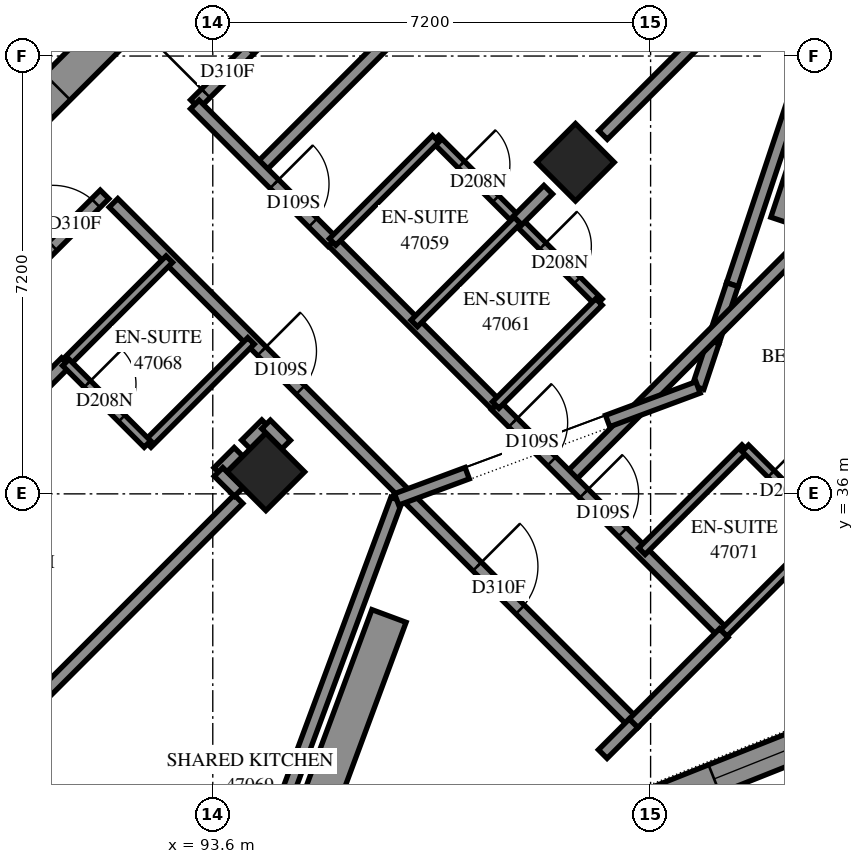
"""IFC4 building model, lengths in metres.
Left out: names, types, materials, properties, quantities, classifications, styles, units other than length and angle.
Written with IfcOpenShell. Run it as: python <this file> out.ifc"""

import sys

from ifc_helpers import new_model, si_unit, direction, frame, frame_2d, origin, origin_2d, place, context, subcontext, project, spatial, polyline, rectangle, outline, extrude, element, fill, save


model = new_model("IFC4")
c1 = context("Model", 3, precision=1e-05, world=origin(), true_north=direction((0.0, 1.0)))
c2 = subcontext(c1, "Body", "Model", "MODEL_VIEW")
j1 = project(units=[si_unit("LENGTHUNIT", "METRE"), si_unit("PLANEANGLEUNIT", "RADIAN")], contexts=[c1])
p1 = place(None, origin())
s1 = spatial("IfcSite", under=j1, at=p1, CompositionType="ELEMENT")
p2 = place(p1, origin())
s2 = spatial("IfcBuilding", under=s1, at=p2, CompositionType="ELEMENT")
p3 = place(p2, frame((0.0, 0.0, 172.8)))
s3 = spatial("IfcBuildingStorey", under=s2, at=p3, CompositionType="ELEMENT", Elevation=172.8)
for number, where, z_axis, x_axis in (
    (1, (99.565, 41.453, 0.0), (0.0, 0.0, 1.0), (0.707, -0.707, 0.0)),
    (2, (94.474, 36.362, 0.0), (0.0, 0.0, 1.0), (0.707, -0.707, 0.0)),
):
    element("IfcColumn", number, at=place(p3, frame(where, z_axis=z_axis, x_axis=x_axis)), inside=s3, PredefinedType="COLUMN", context=c2, shape_type="SweptSolid", body=[
        extrude(rectangle(XDim=0.9, YDim=0.9, at=origin_2d()), origin(), (0.0, 0.0, 1.0), 3.1),
    ])
p4 = place(p3, frame((87.049, 38.695, -0.3), z_axis=(0.0, 0.0, 1.0), x_axis=(0.7071067812, 0.7071067812, 0.0)))
e3 = element("IfcWall", 3, at=p4, inside=s3, PredefinedType="SHEAR", context=c2, shape_type="SweptSolid", body=[
    extrude(rectangle(XDim=14.4, YDim=0.6, at=frame_2d((7.2, 0.0))), origin(), (0.0, 0.0, 1.0), 2.7),
])
p5 = place(p4, frame((4.55, 0.0, 0.3)))
e4 = element("IfcOpeningElement", 4, at=p5, cuts=e3, PredefinedType="OPENING", context=c2, shape_type="SweptSolid", body=[
    extrude(rectangle(XDim=1.1, YDim=2.1, at=frame_2d((0.55, 1.05))), frame((0.0, 0.31, 0.0), z_axis=(0.0, -1.0, 0.0), x_axis=(1.0, 0.0, 0.0)), (0.0, 0.0, 1.0), 0.62),
])
p6 = place(p4, frame((11.35, 0.0, 0.3)))
e5 = element("IfcOpeningElement", 5, at=p6, cuts=e3, PredefinedType="OPENING", context=c2, shape_type="SweptSolid", body=[
    extrude(rectangle(XDim=1.1, YDim=2.1, at=frame_2d((0.55, 1.05))), frame((0.0, 0.31, 0.0), z_axis=(0.0, -1.0, 0.0), x_axis=(1.0, 0.0, 0.0)), (0.0, 0.0, 1.0), 0.62),
])
p7 = place(p3, frame((100.776, 30.887, 0.0), z_axis=(0.0, 0.0, 1.0), x_axis=(0.9291503682, 0.3697020331, 0.0)))
e6 = element("IfcWall", 6, at=p7, inside=s3, PredefinedType="SOLIDWALL", context=c2, shape_type="SweptSolid", body=[
    extrude(outline(polyline([(0.108, -0.25), (5.669, -0.25), (5.444, 0.25), (-0.108, 0.25), (0.108, -0.25)])), origin(), (0.0, 0.0, 1.0), 3.1),
])
p8 = place(p7, frame((1.15, 0.0, 0.7)))
e7 = element("IfcOpeningElement", 7, at=p8, cuts=e6, PredefinedType="OPENING", context=c2, shape_type="SweptSolid", body=[
    extrude(rectangle(XDim=1.8, YDim=2.1, at=frame_2d((0.9, 1.05))), frame((0.0, 0.26, 0.0), z_axis=(0.0, -1.0, 0.0), x_axis=(1.0, 0.0, 0.0)), (0.0, 0.0, 1.0), 0.52),
])
p9 = place(p3, frame((100.13, 46.544, 0.0), z_axis=(0.0, 0.0, 1.0), x_axis=(0.7070852627, -0.707128299, 0.0)))
e8 = element("IfcWall", 8, at=p9, inside=s3, PredefinedType="PARAPET", context=c2, shape_type="SweptSolid", body=[
    extrude(outline(polyline([(-0.1, -0.1), (4.585, -0.1), (4.709, 0.1), (0.1, 0.1), (-0.1, -0.1)])), origin(), (0.0, 0.0, 1.0), 0.25),
])
p10 = place(p3, frame((103.291, 42.881, 0.0), z_axis=(0.0, 0.0, 1.0), x_axis=(-0.3162443117, -0.9486777827, 0.0)))
e9 = element("IfcWall", 9, at=p10, inside=s3, PredefinedType="PARAPET", context=c2, shape_type="SweptSolid", body=[
    extrude(outline(polyline([(0.0, -0.1), (3.626, -0.1), (3.626, 0.1), (0.0, 0.1), (0.0, -0.1)])), origin(), (0.0, 0.0, 1.0), 0.25),
])
p11 = place(p3, frame((102.144, 39.441, 0.0), z_axis=(0.0, 0.0, 1.0), x_axis=(-0.3161671582, -0.9487034985, 0.0)))
e10 = element("IfcWall", 10, at=p11, inside=s3, PredefinedType="PARAPET", context=c2, shape_type="SweptSolid", body=[
    extrude(outline(polyline([(0.0, -0.1), (0.99, -0.1), (0.99, 0.1), (0.0, 0.1), (0.0, -0.1)])), origin(), (0.0, 0.0, 1.0), 0.25),
])
p12 = place(p3, frame((101.831, 38.502, 0.0), z_axis=(0.0, 0.0, 1.0), x_axis=(-0.3163035263, -0.9486580413, 0.0)))
e11 = element("IfcWall", 11, at=p12, inside=s3, PredefinedType="PARAPET", context=c2, shape_type="SweptSolid", body=[
    extrude(outline(polyline([(0.0, -0.1), (0.744, -0.1), (0.84, 0.1), (0.0, 0.1), (0.0, -0.1)])), origin(), (0.0, 0.0, 1.0), 0.25),
])
p13 = place(p3, frame((96.623, 35.909, 0.0), z_axis=(0.0, 0.0, 1.0), x_axis=(-0.3481832062, -0.9374265064, 0.0)))
e12 = element("IfcWall", 12, at=p13, inside=s3, PredefinedType="PARAPET", context=c2, shape_type="SweptSolid", body=[
    extrude(outline(polyline([(-0.046, -0.1), (5.24, -0.1), (5.336, 0.1), (0.046, 0.1), (-0.046, -0.1)])), origin(), (0.0, 0.0, 1.0), 0.25),
])
p14 = place(p3, frame((103.623, 42.138, 0.0), z_axis=(0.0, 0.0, 1.0), x_axis=(-0.3162446684, -0.9486776638, 0.0)))
e13 = element("IfcWall", 13, at=p14, inside=s3, PredefinedType="SOLIDWALL", context=c2, shape_type="SweptSolid", body=[
    extrude(rectangle(XDim=1.775, YDim=0.6, at=frame_2d((0.887, 0.0))), origin(), (0.0, 0.0, 1.0), 0.65),
])
p15 = place(p3, frame((96.498, 33.992, 0.0), z_axis=(0.0, 0.0, 1.0), x_axis=(-0.3481905653, -0.937423773, 0.0)))
e14 = element("IfcWall", 14, at=p15, inside=s3, PredefinedType="SOLIDWALL", context=c2, shape_type="SweptSolid", body=[
    extrude(rectangle(XDim=3.111, YDim=0.6, at=frame_2d((1.555, 0.0))), origin(), (0.0, 0.0, 1.0), 0.65),
])
p16 = place(p3, frame((94.366, 41.348, 0.0), z_axis=(0.0, 0.0, 1.0), x_axis=(0.7071108825, 0.7071026798, 0.0)))
e15 = element("IfcWall", 15, at=p16, inside=s3, PredefinedType="PARTITIONING", context=c2, shape_type="SweptSolid", body=[
    extrude(rectangle(XDim=12.191, YDim=0.2, at=frame_2d((6.096, 0.0))), origin(), (0.0, 0.0, 1.0), 3.1),
])
p17 = place(p3, frame((91.967, 40.785, 0.0), z_axis=(0.0, 0.0, 1.0), x_axis=(0.7071067812, -0.7071067812, 0.0)))
e16 = element("IfcWall", 16, at=p17, inside=s3, PredefinedType="PARTITIONING", context=c2, shape_type="SweptSolid", body=[
    extrude(rectangle(XDim=12.1, YDim=0.2, at=frame_2d((6.05, 0.0))), origin(), (0.0, 0.0, 1.0), 3.1),
])
p18 = place(p17, frame((3.448, 0.0, 0.0)))
e17 = element("IfcOpeningElement", 17, at=p18, cuts=e16, PredefinedType="OPENING", context=c2, shape_type="SweptSolid", body=[
    extrude(rectangle(XDim=0.9, YDim=2.1, at=frame_2d((0.45, 1.05))), frame((0.0, 0.11, 0.0), z_axis=(0.0, -1.0, 0.0), x_axis=(1.0, 0.0, 0.0)), (0.0, 0.0, 1.0), 0.22),
])
p19 = place(p17, frame((8.457, 0.0, 0.0)))
e18 = element("IfcOpeningElement", 18, at=p19, cuts=e16, PredefinedType="OPENING", context=c2, shape_type="SweptSolid", body=[
    extrude(rectangle(XDim=1.0, YDim=2.1, at=frame_2d((0.5, 1.05))), frame((0.0, 0.11, 0.0), z_axis=(0.0, -1.0, 0.0), x_axis=(1.0, 0.0, 0.0)), (0.0, 0.0, 1.0), 0.22),
])
p20 = place(p3, frame((93.306, 42.408, 0.0), z_axis=(0.0, 0.0, 1.0), x_axis=(0.7071067812, 0.7071067812, 0.0)))
e19 = element("IfcWall", 19, at=p20, inside=s3, PredefinedType="PARTITIONING", context=c2, shape_type="SweptSolid", body=[
    extrude(rectangle(XDim=9.45, YDim=0.2, at=frame_2d((4.725, 0.0))), origin(), (0.0, 0.0, 1.0), 3.1),
])
p21 = place(p20, frame((0.253, 0.0, 0.0)))
e20 = element("IfcOpeningElement", 20, at=p21, cuts=e19, PredefinedType="OPENING", context=c2, shape_type="SweptSolid", body=[
    extrude(rectangle(XDim=1.0, YDim=2.1, at=frame_2d((0.5, 1.05))), frame((0.0, 0.11, 0.0), z_axis=(0.0, -1.0, 0.0), x_axis=(1.0, 0.0, 0.0)), (0.0, 0.0, 1.0), 0.22),
])
p22 = place(p3, frame((86.834, 35.94, 0.0), z_axis=(0.0, 0.0, 1.0), x_axis=(0.7072486139, 0.7069649201, 0.0)))
e21 = element("IfcWall", 21, at=p22, inside=s3, PredefinedType="PARTITIONING", context=c2, shape_type="SweptSolid", body=[
    extrude(rectangle(XDim=7.05, YDim=0.2, at=frame_2d((3.525, 0.0))), origin(), (0.0, 0.0, 1.0), 3.1),
])
p23 = place(p22, frame((5.848, 0.0, 0.0)))
e22 = element("IfcOpeningElement", 22, at=p23, cuts=e21, PredefinedType="OPENING", context=c2, shape_type="SweptSolid", body=[
    extrude(rectangle(XDim=1.0, YDim=2.1, at=frame_2d((0.5, 1.05))), frame((0.0, 0.11, 0.0), z_axis=(0.0, -1.0, 0.0), x_axis=(1.0, 0.0, 0.0)), (0.0, 0.0, 1.0), 0.22),
])
p24 = place(p3, frame((86.33, 33.314, 0.0), z_axis=(0.0, 0.0, 1.0), x_axis=(0.7072524653, 0.7069610671, 0.0)))
e23 = element("IfcWall", 23, at=p24, inside=s3, PredefinedType="PARTITIONING", context=c2, shape_type="SweptSolid", body=[
    extrude(rectangle(XDim=6.864, YDim=0.2, at=frame_2d((3.432, 0.0))), origin(), (0.0, 0.0, 1.0), 3.1),
])
p25 = place(p3, frame((99.458, 36.256, 0.0), z_axis=(0.0, 0.0, 1.0), x_axis=(0.7071067812, 0.7071067812, 0.0)))
e24 = element("IfcWall", 24, at=p25, inside=s3, PredefinedType="PARTITIONING", context=c2, shape_type="SweptSolid", body=[
    extrude(rectangle(XDim=6.85, YDim=0.2, at=frame_2d((3.425, 0.0))), origin(), (0.0, 0.0, 1.0), 3.1),
])
p26 = place(p3, frame((89.831, 31.721, 0.0), z_axis=(0.0, 0.0, 1.0), x_axis=(0.7071067812, 0.7071067812, 0.0)))
e25 = element("IfcWall", 25, at=p26, inside=s3, PredefinedType="PARTITIONING", context=c2, shape_type="SweptSolid", body=[
    extrude(rectangle(XDim=5.928, YDim=0.2, at=frame_2d((2.964, 0.0))), origin(), (0.0, 0.0, 1.0), 2.6),
])
p27 = place(p3, frame((100.017, 41.901, 0.0), z_axis=(0.0, 0.0, 1.0), x_axis=(0.7072754814, 0.7069380408, 0.0)))
e26 = element("IfcWall", 26, at=p27, inside=s3, PredefinedType="PARTITIONING", context=c2, shape_type="SweptSolid", body=[
    extrude(rectangle(XDim=5.927, YDim=0.2, at=frame_2d((2.963, 0.0))), origin(), (0.0, 0.0, 1.0), 3.1),
])
p28 = place(p3, frame((98.253, 37.455, 0.0), z_axis=(0.0, 0.0, 1.0), x_axis=(0.7071067812, -0.7071067812, 0.0)))
e27 = element("IfcWall", 27, at=p28, inside=s3, PredefinedType="PARTITIONING", context=c2, shape_type="SweptSolid", body=[
    extrude(rectangle(XDim=5.301, YDim=0.2, at=frame_2d((2.65, 0.0))), origin(), (0.0, 0.0, 1.0), 3.1),
])
p29 = place(p28, frame((0.401, 0.0, 0.0)))
e28 = element("IfcOpeningElement", 28, at=p29, cuts=e27, PredefinedType="OPENING", context=c2, shape_type="SweptSolid", body=[
    extrude(rectangle(XDim=0.9, YDim=2.1, at=frame_2d((0.45, 1.05))), frame((0.0, 0.11, 0.0), z_axis=(0.0, -1.0, 0.0), x_axis=(1.0, 0.0, 0.0)), (0.0, 0.0, 1.0), 0.22),
])
p30 = place(p28, frame((2.05, 0.0, 0.0)))
e29 = element("IfcOpeningElement", 29, at=p30, cuts=e27, PredefinedType="OPENING", context=c2, shape_type="SweptSolid", body=[
    extrude(rectangle(XDim=0.9, YDim=2.1, at=frame_2d((0.45, 1.05))), frame((0.0, 0.11, 0.0), z_axis=(0.0, -1.0, 0.0), x_axis=(1.0, 0.0, 0.0)), (0.0, 0.0, 1.0), 0.22),
])
p31 = place(p3, frame((97.263, 41.839, 0.0), z_axis=(0.0, 0.0, 1.0), x_axis=(0.7071067812, -0.7071067812, 0.0)))
e30 = element("IfcWall", 30, at=p31, inside=s3, PredefinedType="PARTITIONING", context=c2, shape_type="SweptSolid", body=[
    extrude(rectangle(XDim=3.801, YDim=0.15, at=frame_2d((1.901, 0.0))), origin(), (0.0, 0.0, 1.0), 3.1),
])
p32 = place(p31, frame((0.598, 0.0, 0.0)))
e31 = element("IfcOpeningElement", 31, at=p32, cuts=e30, PredefinedType="OPENING", context=c2, shape_type="SweptSolid", body=[
    extrude(rectangle(XDim=0.8, YDim=2.1, at=frame_2d((0.4, 1.05))), frame((0.0, 0.085, 0.0), z_axis=(0.0, -1.0, 0.0), x_axis=(1.0, 0.0, 0.0)), (0.0, 0.0, 1.0), 0.17),
])
p33 = place(p31, frame((2.493, 0.0, 0.0)))
e32 = element("IfcOpeningElement", 32, at=p33, cuts=e30, PredefinedType="OPENING", context=c2, shape_type="SweptSolid", body=[
    extrude(rectangle(XDim=0.8, YDim=2.1, at=frame_2d((0.4, 1.05))), frame((0.0, 0.085, 0.0), z_axis=(0.0, -1.0, 0.0), x_axis=(1.0, 0.0, 0.0)), (0.0, 0.0, 1.0), 0.17),
])
p34 = place(p3, frame((95.573, 40.148, 0.0), z_axis=(0.0, 0.0, 1.0), x_axis=(0.7068698107, -0.7073436723, 0.0)))
e33 = element("IfcWall", 33, at=p34, inside=s3, PredefinedType="PARTITIONING", context=c2, shape_type="SweptSolid", body=[
    extrude(rectangle(XDim=3.799, YDim=0.2, at=frame_2d((1.899, 0.0))), origin(), (0.0, 0.0, 1.0), 3.1),
])
p35 = place(p3, frame((93.305, 42.403, 0.0), z_axis=(0.0, 0.0, 1.0), x_axis=(0.7071067812, -0.7071067812, 0.0)))
e34 = element("IfcWall", 34, at=p35, inside=s3, PredefinedType="PARTITIONING", context=c2, shape_type="SweptSolid", body=[
    extrude(rectangle(XDim=3.199, YDim=0.2, at=frame_2d((1.599, 0.0))), origin(), (0.0, 0.0, 1.0), 3.1),
])
p36 = place(p35, frame((1.848, 0.0, 0.0)))
e35 = element("IfcOpeningElement", 35, at=p36, cuts=e34, PredefinedType="OPENING", context=c2, shape_type="SweptSolid", body=[
    extrude(rectangle(XDim=0.9, YDim=2.1, at=frame_2d((0.45, 1.05))), frame((0.0, 0.11, 0.0), z_axis=(0.0, -1.0, 0.0), x_axis=(1.0, 0.0, 0.0)), (0.0, 0.0, 1.0), 0.22),
])
p37 = place(p3, frame((102.003, 33.711, 0.0), z_axis=(0.0, 0.0, 1.0), x_axis=(0.7071067812, 0.7071067812, 0.0)))
e36 = element("IfcWall", 36, at=p37, inside=s3, PredefinedType="PARTITIONING", context=c2, shape_type="SweptSolid", body=[
    extrude(rectangle(XDim=2.401, YDim=0.15, at=frame_2d((1.201, 0.0))), origin(), (0.0, 0.0, 1.0), 3.1),
])
for number, where, z_axis, x_axis in (
    (37, (95.571, 40.143, 0.0), (0.0, 0.0, 1.0), (0.707, 0.708, 0.0)),
    (38, (98.253, 37.461, 0.0), (0.0, 0.0, 1.0), (0.708, 0.707, 0.0)),
    (39, (100.657, 35.057, 0.0), (0.0, 0.0, 1.0), (0.708, 0.707, 0.0)),
    (40, (91.189, 38.161, 0.0), (0.0, 0.0, 1.0), (0.707, 0.708, 0.0)),
    (41, (92.531, 36.819, 0.0), (0.0, 0.0, 1.0), (0.708, 0.707, 0.0)),
):
    element("IfcWall", number, at=place(p3, frame(where, z_axis=z_axis, x_axis=x_axis)), inside=s3, PredefinedType="PARTITIONING", context=c2, shape_type="SweptSolid", body=[
        extrude(rectangle(XDim=2.4, YDim=0.15, at=frame_2d((1.2, 0.0))), origin(), (0.0, 0.0, 1.0), 3.1),
    ])
p38 = place(p3, frame((96.913, 38.803, 0.0), z_axis=(0.0, 0.0, 1.0), x_axis=(0.7071067812, 0.7071067812, 0.0)))
e42 = element("IfcWall", 42, at=p38, inside=s3, PredefinedType="PARTITIONING", context=c2, shape_type="SweptSolid", body=[
    extrude(rectangle(XDim=2.398, YDim=0.15, at=frame_2d((1.199, 0.0))), origin(), (0.0, 0.0, 1.0), 2.6),
])
p39 = place(p3, frame((100.519, 32.227, 0.0), z_axis=(0.0, 0.0, 1.0), x_axis=(0.7071067812, 0.7071067812, 0.0)))
e43 = element("IfcWall", 43, at=p39, inside=s3, PredefinedType="PARTITIONING", context=c2, shape_type="SweptSolid", body=[
    extrude(rectangle(XDim=2.099, YDim=0.2, at=frame_2d((1.049, 0.0))), origin(), (0.0, 0.0, 1.0), 3.1),
])
p40 = place(p3, frame((102.358, 36.75, 0.0), z_axis=(0.0, 0.0, 1.0), x_axis=(0.7076330979, -0.7065800724, 0.0)))
e44 = element("IfcWall", 44, at=p40, inside=s3, PredefinedType="PARTITIONING", context=c2, shape_type="SweptSolid", body=[
    extrude(rectangle(XDim=1.899, YDim=0.15, at=frame_2d((0.95, 0.0))), origin(), (0.0, 0.0, 1.0), 3.1),
])
p41 = place(p40, frame((0.597, 0.0, 0.0)))
e45 = element("IfcOpeningElement", 45, at=p41, cuts=e44, PredefinedType="OPENING", context=c2, shape_type="SweptSolid", body=[
    extrude(rectangle(XDim=0.8, YDim=2.1, at=frame_2d((0.4, 1.05))), frame((0.0, 0.085, 0.0), z_axis=(0.0, -1.0, 0.0), x_axis=(1.0, 0.0, 0.0)), (0.0, 0.0, 1.0), 0.17),
])
p42 = place(p3, frame((91.183, 38.161, 0.0), z_axis=(0.0, 0.0, 1.0), x_axis=(0.7071067812, -0.7071067812, 0.0)))
e46 = element("IfcWall", 46, at=p42, inside=s3, PredefinedType="PARTITIONING", context=c2, shape_type="SweptSolid", body=[
    extrude(rectangle(XDim=1.898, YDim=0.15, at=frame_2d((0.949, 0.0))), origin(), (0.0, 0.0, 1.0), 3.1),
])
p43 = place(p42, frame((0.501, 0.0, 0.0)))
e47 = element("IfcOpeningElement", 47, at=p43, cuts=e46, PredefinedType="OPENING", context=c2, shape_type="SweptSolid", body=[
    extrude(rectangle(XDim=0.8, YDim=2.1, at=frame_2d((0.4, 1.05))), frame((0.0, 0.085, 0.0), z_axis=(0.0, -1.0, 0.0), x_axis=(1.0, 0.0, 0.0)), (0.0, 0.0, 1.0), 0.17),
])
p44 = place(p3, frame((100.013, 31.721, 0.0), z_axis=(0.0, 0.0, 1.0), x_axis=(0.7071067812, 0.7071067812, 0.0)))
e48 = element("IfcWall", 48, at=p44, inside=s3, PredefinedType="PARTITIONING", context=c2, shape_type="SweptSolid", body=[
    extrude(rectangle(XDim=0.716, YDim=0.2, at=frame_2d((0.358, 0.0))), origin(), (0.0, 0.0, 1.0), 3.1),
])
p45 = place(p3, frame((98.613, 40.495, 0.0), z_axis=(0.0, 0.0, 1.0), x_axis=(0.7057051861, 0.7085056035, 0.0)))
e49 = element("IfcWall", 49, at=p45, inside=s3, PredefinedType="PARTITIONING", context=c2, shape_type="SweptSolid", body=[
    extrude(rectangle(XDim=0.714, YDim=0.2, at=frame_2d((0.357, 0.0))), origin(), (0.0, 0.0, 1.0), 2.6),
])
for number, where, z_axis, x_axis in (
    (50, (94.145, 36.813, 0.0), (0.0, 0.0, 1.0), (0.707, 0.707, 0.0)),
    (51, (93.691, 36.359, 0.0), (0.0, 0.0, 1.0), (0.707, 0.707, 0.0)),
):
    element("IfcWall", number, at=place(p3, frame(where, z_axis=z_axis, x_axis=x_axis)), inside=s3, PredefinedType="PARTITIONING", context=c2, shape_type="SweptSolid", body=[
        extrude(rectangle(XDim=0.469, YDim=0.2, at=frame_2d((0.235, 0.0))), origin(), (0.0, 0.0, 1.0), 3.1),
    ])
for number, where, z_axis, x_axis in (
    (52, (94.476, 37.142, 0.0), (0.0, 0.0, 1.0), (0.705, -0.709, 0.0)),
    (53, (93.695, 36.361, 0.0), (0.0, 0.0, 1.0), (0.709, -0.705, 0.0)),
):
    element("IfcWall", number, at=place(p3, frame(where, z_axis=z_axis, x_axis=x_axis)), inside=s3, PredefinedType="PARTITIONING", context=c2, shape_type="SweptSolid", body=[
        extrude(rectangle(XDim=0.468, YDim=0.2, at=frame_2d((0.234, 0.0))), origin(), (0.0, 0.0, 1.0), 3.1),
    ])
p46 = place(p3, frame((101.581, 37.751, 0.0), z_axis=(0.0, 0.0, 1.0), x_axis=(-0.9374282115, -0.3481786155, 0.0)))
e54 = element("IfcWall", 54, at=p46, inside=s3, PredefinedType="PARAPET", context=c2, shape_type="SweptSolid", body=[
    extrude(outline(polyline([(0.048, -0.1), (1.586, -0.1), (1.586, 0.1), (-0.048, 0.1), (0.048, -0.1)])), origin(), (0.0, 0.0, 1.0), 0.25),
])
p47 = place(p3, frame((97.784, 36.34, 0.0), z_axis=(0.0, 0.0, 1.0), x_axis=(-0.9374199992, -0.3482007252, 0.0)))
e55 = element("IfcWall", 55, at=p47, inside=s3, PredefinedType="PARAPET", context=c2, shape_type="SweptSolid", body=[
    extrude(outline(polyline([(0.0, -0.1), (1.284, -0.1), (1.192, 0.1), (0.0, 0.1), (0.0, -0.1)])), origin(), (0.0, 0.0, 1.0), 0.25),
])
p48 = place(p8, origin())
e56 = element("IfcWindow", 56, at=p48, inside=s3, PartitioningType="SINGLE_PANEL", PredefinedType="WINDOW", context=c2, shape_type="SweptSolid", body=[
    extrude(rectangle(XDim=1.8, YDim=2.1, at=frame_2d((0.9, 1.05))), frame((0.0, 0.18, 0.0), z_axis=(0.0, -1.0, 0.0), x_axis=(1.0, 0.0, 0.0)), (0.0, 0.0, 1.0), 0.06),
])
fill(e7, e56)
p49 = place(p5, origin())
e57 = element("IfcDoor", 57, at=p49, inside=s3, OperationType="DOUBLE_DOOR_SINGLE_SWING", PredefinedType="DOOR", context=c2, shape_type="SweptSolid", body=[
    extrude(rectangle(XDim=1.1, YDim=2.1, at=frame_2d((0.55, 1.05))), frame((0.0, 0.025, 0.0), z_axis=(0.0, -1.0, 0.0), x_axis=(1.0, 0.0, 0.0)), (0.0, 0.0, 1.0), 0.05),
])
fill(e4, e57)
p50 = place(p21, origin())
e58 = element("IfcDoor", 58, at=p50, inside=s3, OperationType="SINGLE_SWING_RIGHT", PredefinedType="DOOR", context=c2, shape_type="SweptSolid", body=[
    extrude(rectangle(XDim=1.0, YDim=2.1, at=frame_2d((0.5, 1.05))), frame((0.0, 0.025, 0.0), z_axis=(0.0, -1.0, 0.0), x_axis=(1.0, 0.0, 0.0)), (0.0, 0.0, 1.0), 0.05),
])
fill(e20, e58)
p51 = place(p36, origin())
e59 = element("IfcDoor", 59, at=p51, inside=s3, OperationType="SINGLE_SWING_RIGHT", PredefinedType="DOOR", context=c2, shape_type="SweptSolid", body=[
    extrude(rectangle(XDim=0.9, YDim=2.1, at=frame_2d((0.45, 1.05))), frame((0.0, 0.025, 0.0), z_axis=(0.0, -1.0, 0.0), x_axis=(1.0, 0.0, 0.0)), (0.0, 0.0, 1.0), 0.05),
])
fill(e35, e59)
p52 = place(p32, origin())
e60 = element("IfcDoor", 60, at=p52, inside=s3, OperationType="SINGLE_SWING_RIGHT", PredefinedType="DOOR", context=c2, shape_type="SweptSolid", body=[
    extrude(rectangle(XDim=0.8, YDim=2.1, at=frame_2d((0.4, 1.05))), frame((0.0, 0.025, 0.0), z_axis=(0.0, -1.0, 0.0), x_axis=(1.0, 0.0, 0.0)), (0.0, 0.0, 1.0), 0.05),
])
fill(e31, e60)
p53 = place(p29, origin())
e61 = element("IfcDoor", 61, at=p53, inside=s3, OperationType="SINGLE_SWING_LEFT", PredefinedType="DOOR", context=c2, shape_type="SweptSolid", body=[
    extrude(rectangle(XDim=0.9, YDim=2.1, at=frame_2d((0.45, 1.05))), frame((0.0, 0.025, 0.0), z_axis=(0.0, -1.0, 0.0), x_axis=(1.0, 0.0, 0.0)), (0.0, 0.0, 1.0), 0.05),
])
fill(e28, e61)
p54 = place(p33, origin())
e62 = element("IfcDoor", 62, at=p54, inside=s3, OperationType="SINGLE_SWING_RIGHT", PredefinedType="DOOR", context=c2, shape_type="SweptSolid", body=[
    extrude(rectangle(XDim=0.8, YDim=2.1, at=frame_2d((0.4, 1.05))), frame((0.0, 0.025, 0.0), z_axis=(0.0, -1.0, 0.0), x_axis=(1.0, 0.0, 0.0)), (0.0, 0.0, 1.0), 0.05),
])
fill(e32, e62)
p55 = place(p23, origin())
e63 = element("IfcDoor", 63, at=p55, inside=s3, OperationType="SINGLE_SWING_RIGHT", PredefinedType="DOOR", context=c2, shape_type="SweptSolid", body=[
    extrude(rectangle(XDim=1.0, YDim=2.1, at=frame_2d((0.5, 1.05))), frame((0.0, 0.025, 0.0), z_axis=(0.0, -1.0, 0.0), x_axis=(1.0, 0.0, 0.0)), (0.0, 0.0, 1.0), 0.05),
])
fill(e22, e63)
p56 = place(p18, origin())
e64 = element("IfcDoor", 64, at=p56, inside=s3, OperationType="SINGLE_SWING_LEFT", PredefinedType="DOOR", context=c2, shape_type="SweptSolid", body=[
    extrude(rectangle(XDim=0.9, YDim=2.1, at=frame_2d((0.45, 1.05))), frame((0.0, 0.025, 0.0), z_axis=(0.0, -1.0, 0.0), x_axis=(1.0, 0.0, 0.0)), (0.0, 0.0, 1.0), 0.05),
])
fill(e17, e64)
p57 = place(p43, origin())
e65 = element("IfcDoor", 65, at=p57, inside=s3, OperationType="SINGLE_SWING_RIGHT", PredefinedType="DOOR", context=c2, shape_type="SweptSolid", body=[
    extrude(rectangle(XDim=0.8, YDim=2.1, at=frame_2d((0.4, 1.05))), frame((0.0, 0.025, 0.0), z_axis=(0.0, -1.0, 0.0), x_axis=(1.0, 0.0, 0.0)), (0.0, 0.0, 1.0), 0.05),
])
fill(e47, e65)
p58 = place(p19, origin())
e66 = element("IfcDoor", 66, at=p58, inside=s3, OperationType="SINGLE_SWING_RIGHT", PredefinedType="DOOR", context=c2, shape_type="SweptSolid", body=[
    extrude(rectangle(XDim=1.0, YDim=2.1, at=frame_2d((0.5, 1.05))), frame((0.0, 0.025, 0.0), z_axis=(0.0, -1.0, 0.0), x_axis=(1.0, 0.0, 0.0)), (0.0, 0.0, 1.0), 0.05),
])
fill(e18, e66)
p59 = place(p30, origin())
e67 = element("IfcDoor", 67, at=p59, inside=s3, OperationType="SINGLE_SWING_RIGHT", PredefinedType="DOOR", context=c2, shape_type="SweptSolid", body=[
    extrude(rectangle(XDim=0.9, YDim=2.1, at=frame_2d((0.45, 1.05))), frame((0.0, 0.025, 0.0), z_axis=(0.0, -1.0, 0.0), x_axis=(1.0, 0.0, 0.0)), (0.0, 0.0, 1.0), 0.05),
])
fill(e29, e67)
p60 = place(p41, origin())
e68 = element("IfcDoor", 68, at=p60, inside=s3, OperationType="SINGLE_SWING_RIGHT", PredefinedType="DOOR", context=c2, shape_type="SweptSolid", body=[
    extrude(rectangle(XDim=0.8, YDim=2.1, at=frame_2d((0.4, 1.05))), frame((0.0, 0.025, 0.0), z_axis=(0.0, -1.0, 0.0), x_axis=(1.0, 0.0, 0.0)), (0.0, 0.0, 1.0), 0.05),
])
fill(e45, e68)
save(model, sys.argv[1])
